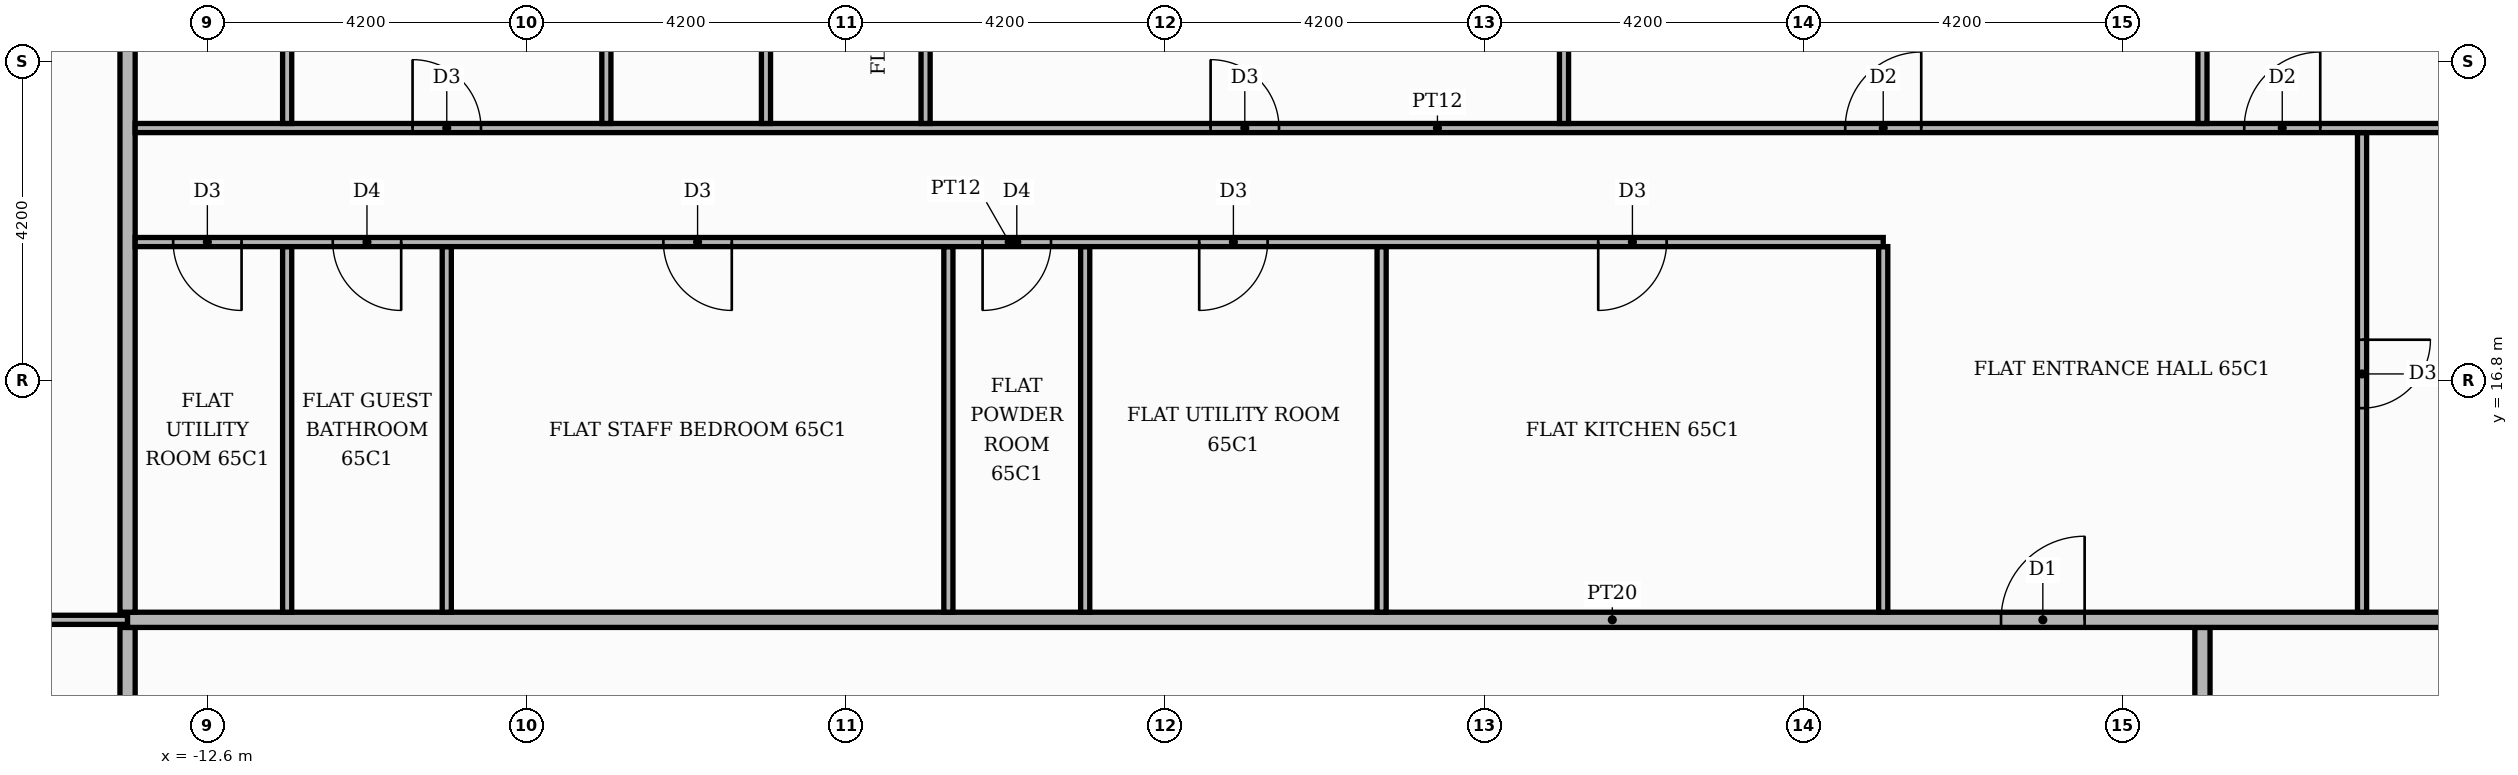
"""IFC4 building model, lengths in metres.
Left out: names, types, materials, properties, quantities, classifications, styles, units other than length and angle.
Written with IfcOpenShell. Run it as: python <this file> out.ifc"""

import sys

from ifc_helpers import new_model, si_unit, direction, frame, frame_2d, origin, place, context, subcontext, project, spatial, rectangle, extrude, element, fill, save


model = new_model("IFC4")
c1 = context("Model", 3, precision=1e-05, world=origin(), true_north=direction((0.0, 1.0)))
c2 = subcontext(c1, "Body", "Model", "MODEL_VIEW")
j1 = project(units=[si_unit("LENGTHUNIT", "METRE"), si_unit("PLANEANGLEUNIT", "RADIAN")], contexts=[c1])
p1 = place(None, origin())
s1 = spatial("IfcSite", under=j1, at=p1, CompositionType="ELEMENT")
p2 = place(p1, origin())
s2 = spatial("IfcBuilding", under=s1, at=p2, CompositionType="ELEMENT")
p3 = place(p2, frame((0.0, 0.0, 271.8)))
s3 = spatial("IfcBuildingStorey", under=s2, at=p3, CompositionType="ELEMENT", Elevation=271.8)
for number, where, z_axis, x_axis in (
    (1, (-13.65, 11.1, 0.0), (0.0, 0.0, 1.0), (0.0, 1.0, 0.0)),
    (2, (13.65, 11.1, 0.0), (0.0, 0.0, 1.0), (0.0, 1.0, 0.0)),
):
    element("IfcWall", number, at=place(p3, frame(where, z_axis=z_axis, x_axis=x_axis)), inside=s3, PredefinedType="PARTITIONING", context=c2, shape_type="SweptSolid", body=[
        extrude(rectangle(XDim=2.45, YDim=0.2, at=frame_2d((1.225, 0.0))), origin(), (0.0, 0.0, 1.0), 3.48),
    ])
p4 = place(p3, frame((-20.42, 13.65, 0.0), z_axis=(0.0, 0.0, 1.0), x_axis=(1.0, 0.0, 0.0)))
e3 = element("IfcWall", 3, at=p4, inside=s3, PredefinedType="PARTITIONING", context=c2, shape_type="SweptSolid", body=[
    extrude(rectangle(XDim=6.77, YDim=0.12, at=frame_2d((3.385, 0.0))), origin(), (0.0, 0.0, 1.0), 3.48),
])
p5 = place(p4, frame((2.885, 0.0, 0.0)))
e4 = element("IfcOpeningElement", 4, at=p5, cuts=e3, PredefinedType="OPENING", context=c2, shape_type="SweptSolid", body=[
    extrude(rectangle(XDim=1.0, YDim=2.1, at=frame_2d((0.5, 1.05))), frame((0.0, 0.07, 0.0), z_axis=(0.0, -1.0, 0.0), x_axis=(1.0, 0.0, 0.0)), (0.0, 0.0, 1.0), 0.14),
])
p6 = place(p3, frame((-13.65, 13.65, 0.0), z_axis=(0.0, 0.0, 1.0), x_axis=(1.0, 0.0, 0.0)))
e5 = element("IfcWall", 5, at=p6, inside=s3, PredefinedType="PARTITIONING", context=c2, shape_type="SweptSolid", body=[
    extrude(rectangle(XDim=39.07, YDim=0.2, at=frame_2d((19.535, 0.0))), origin(), (0.0, 0.0, 1.0), 3.48),
])
p7 = place(p6, frame((24.65, 0.0, 0.0)))
e6 = element("IfcOpeningElement", 6, at=p7, cuts=e5, PredefinedType="OPENING", context=c2, shape_type="SweptSolid", body=[
    extrude(rectangle(XDim=1.1, YDim=2.4, at=frame_2d((0.55, 1.2))), frame((0.0, 0.11, 0.0), z_axis=(0.0, -1.0, 0.0), x_axis=(1.0, 0.0, 0.0)), (0.0, 0.0, 1.0), 0.22),
])
p8 = place(p3, frame((-13.65, 13.75, 0.0), z_axis=(0.0, 0.0, 1.0), x_axis=(0.0, 1.0, 0.0)))
e7 = element("IfcWall", 7, at=p8, inside=s3, PredefinedType="PARTITIONING", context=c2, shape_type="SweptSolid", body=[
    extrude(rectangle(XDim=11.67, YDim=0.2, at=frame_2d((5.835, 0.0))), origin(), (0.0, 0.0, 1.0), 3.48),
])
for number, where, z_axis, x_axis in (
    (8, (-11.55, 13.75, 0.0), (0.0, 0.0, 1.0), (0.0, 1.0, 0.0)),
    (9, (-9.45, 13.75, 0.0), (0.0, 0.0, 1.0), (0.0, 1.0, 0.0)),
    (10, (-2.85, 13.75, 0.0), (0.0, 0.0, 1.0), (0.0, 1.0, 0.0)),
    (11, (-1.05, 13.75, 0.0), (0.0, 0.0, 1.0), (0.0, 1.0, 0.0)),
    (12, (2.85, 13.75, 0.0), (0.0, 0.0, 1.0), (0.0, 1.0, 0.0)),
    (13, (9.45, 13.75, 0.0), (0.0, 0.0, 1.0), (0.0, 1.0, 0.0)),
):
    element("IfcWall", number, at=place(p3, frame(where, z_axis=z_axis, x_axis=x_axis)), inside=s3, PredefinedType="PARTITIONING", context=c2, shape_type="SweptSolid", body=[
        extrude(rectangle(XDim=4.81, YDim=0.12, at=frame_2d((2.405, 0.0))), origin(), (0.0, 0.0, 1.0), 3.48),
    ])
p9 = place(p3, frame((15.75, 13.75, 0.0), z_axis=(0.0, 0.0, 1.0), x_axis=(0.0, 1.0, 0.0)))
e14 = element("IfcWall", 14, at=p9, inside=s3, PredefinedType="PARTITIONING", context=c2, shape_type="SweptSolid", body=[
    extrude(rectangle(XDim=6.31, YDim=0.12, at=frame_2d((3.155, 0.0))), origin(), (0.0, 0.0, 1.0), 3.48),
])
p10 = place(p9, frame((2.685, 0.0, 0.0)))
e15 = element("IfcOpeningElement", 15, at=p10, cuts=e14, PredefinedType="OPENING", context=c2, shape_type="SweptSolid", body=[
    extrude(rectangle(XDim=0.9, YDim=2.1, at=frame_2d((0.45, 1.05))), frame((0.0, 0.07, 0.0), z_axis=(0.0, -1.0, 0.0), x_axis=(1.0, 0.0, 0.0)), (0.0, 0.0, 1.0), 0.14),
])
p11 = place(p3, frame((-13.55, 18.62, 0.0), z_axis=(0.0, 0.0, 1.0), x_axis=(1.0, 0.0, 0.0)))
e16 = element("IfcWall", 16, at=p11, inside=s3, PredefinedType="PARTITIONING", context=c2, shape_type="SweptSolid", body=[
    extrude(rectangle(XDim=23.0, YDim=0.12, at=frame_2d((11.5, 0.0))), origin(), (0.0, 0.0, 1.0), 3.48),
])
p12 = place(p11, frame((19.25, 0.0, 0.0)))
e17 = element("IfcOpeningElement", 17, at=p12, cuts=e16, PredefinedType="OPENING", context=c2, shape_type="SweptSolid", body=[
    extrude(rectangle(XDim=0.9, YDim=2.1, at=frame_2d((0.45, 1.05))), frame((0.0, 0.07, 0.0), z_axis=(0.0, -1.0, 0.0), x_axis=(1.0, 0.0, 0.0)), (0.0, 0.0, 1.0), 0.14),
])
p13 = place(p11, frame((14.0, 0.0, 0.0)))
e18 = element("IfcOpeningElement", 18, at=p13, cuts=e16, PredefinedType="OPENING", context=c2, shape_type="SweptSolid", body=[
    extrude(rectangle(XDim=0.9, YDim=2.1, at=frame_2d((0.45, 1.05))), frame((0.0, 0.07, 0.0), z_axis=(0.0, -1.0, 0.0), x_axis=(1.0, 0.0, 0.0)), (0.0, 0.0, 1.0), 0.14),
])
p14 = place(p11, frame((11.15, 0.0, 0.0)))
e19 = element("IfcOpeningElement", 19, at=p14, cuts=e16, PredefinedType="OPENING", context=c2, shape_type="SweptSolid", body=[
    extrude(rectangle(XDim=0.9, YDim=2.1, at=frame_2d((0.45, 1.05))), frame((0.0, 0.07, 0.0), z_axis=(0.0, -1.0, 0.0), x_axis=(1.0, 0.0, 0.0)), (0.0, 0.0, 1.0), 0.14),
])
p15 = place(p11, frame((6.95, 0.0, 0.0)))
e20 = element("IfcOpeningElement", 20, at=p15, cuts=e16, PredefinedType="OPENING", context=c2, shape_type="SweptSolid", body=[
    extrude(rectangle(XDim=0.9, YDim=2.1, at=frame_2d((0.45, 1.05))), frame((0.0, 0.07, 0.0), z_axis=(0.0, -1.0, 0.0), x_axis=(1.0, 0.0, 0.0)), (0.0, 0.0, 1.0), 0.14),
])
p16 = place(p11, frame((2.6, 0.0, 0.0)))
e21 = element("IfcOpeningElement", 21, at=p16, cuts=e16, PredefinedType="OPENING", context=c2, shape_type="SweptSolid", body=[
    extrude(rectangle(XDim=0.9, YDim=2.1, at=frame_2d((0.45, 1.05))), frame((0.0, 0.07, 0.0), z_axis=(0.0, -1.0, 0.0), x_axis=(1.0, 0.0, 0.0)), (0.0, 0.0, 1.0), 0.14),
])
p17 = place(p11, frame((0.5, 0.0, 0.0)))
e22 = element("IfcOpeningElement", 22, at=p17, cuts=e16, PredefinedType="OPENING", context=c2, shape_type="SweptSolid", body=[
    extrude(rectangle(XDim=0.9, YDim=2.1, at=frame_2d((0.45, 1.05))), frame((0.0, 0.07, 0.0), z_axis=(0.0, -1.0, 0.0), x_axis=(1.0, 0.0, 0.0)), (0.0, 0.0, 1.0), 0.14),
])
p18 = place(p3, frame((-13.55, 20.12, 0.0), z_axis=(0.0, 0.0, 1.0), x_axis=(1.0, 0.0, 0.0)))
e23 = element("IfcWall", 23, at=p18, inside=s3, PredefinedType="PARTITIONING", context=c2, shape_type="SweptSolid", body=[
    extrude(rectangle(XDim=34.269, YDim=0.12, at=frame_2d((17.135, 0.0))), origin(), (0.0, 0.0, 1.0), 3.48),
])
p19 = place(p18, frame((27.75, 0.0, 0.0)))
e24 = element("IfcOpeningElement", 24, at=p19, cuts=e23, PredefinedType="OPENING", context=c2, shape_type="SweptSolid", body=[
    extrude(rectangle(XDim=1.0, YDim=2.1, at=frame_2d((0.5, 1.05))), frame((0.0, 0.07, 0.0), z_axis=(0.0, -1.0, 0.0), x_axis=(1.0, 0.0, 0.0)), (0.0, 0.0, 1.0), 0.14),
])
p20 = place(p18, frame((22.5, 0.0, 0.0)))
e25 = element("IfcOpeningElement", 25, at=p20, cuts=e23, PredefinedType="OPENING", context=c2, shape_type="SweptSolid", body=[
    extrude(rectangle(XDim=1.0, YDim=2.1, at=frame_2d((0.5, 1.05))), frame((0.0, 0.07, 0.0), z_axis=(0.0, -1.0, 0.0), x_axis=(1.0, 0.0, 0.0)), (0.0, 0.0, 1.0), 0.14),
])
p21 = place(p18, frame((14.15, 0.0, 0.0)))
e26 = element("IfcOpeningElement", 26, at=p21, cuts=e23, PredefinedType="OPENING", context=c2, shape_type="SweptSolid", body=[
    extrude(rectangle(XDim=0.9, YDim=2.1, at=frame_2d((0.45, 1.05))), frame((0.0, 0.07, 0.0), z_axis=(0.0, -1.0, 0.0), x_axis=(1.0, 0.0, 0.0)), (0.0, 0.0, 1.0), 0.14),
])
p22 = place(p18, frame((3.65, 0.0, 0.0)))
e27 = element("IfcOpeningElement", 27, at=p22, cuts=e23, PredefinedType="OPENING", context=c2, shape_type="SweptSolid", body=[
    extrude(rectangle(XDim=0.9, YDim=2.1, at=frame_2d((0.45, 1.05))), frame((0.0, 0.07, 0.0), z_axis=(0.0, -1.0, 0.0), x_axis=(1.0, 0.0, 0.0)), (0.0, 0.0, 1.0), 0.14),
])
p23 = place(p3, frame((-11.55, 20.18, 0.0), z_axis=(0.0, 0.0, 1.0), x_axis=(0.0, 1.0, 0.0)))
e28 = element("IfcWall", 28, at=p23, inside=s3, PredefinedType="PARTITIONING", context=c2, shape_type="SweptSolid", body=[
    extrude(rectangle(XDim=5.24, YDim=0.12, at=frame_2d((2.62, 0.0))), origin(), (0.0, 0.0, 1.0), 3.48),
])
p24 = place(p23, frame((2.29, 0.0, 0.0)))
e29 = element("IfcOpeningElement", 29, at=p24, cuts=e28, PredefinedType="OPENING", context=c2, shape_type="SweptSolid", body=[
    extrude(rectangle(XDim=0.9, YDim=2.1, at=frame_2d((0.45, 1.05))), frame((0.0, 0.07, 0.0), z_axis=(0.0, -1.0, 0.0), x_axis=(1.0, 0.0, 0.0)), (0.0, 0.0, 1.0), 0.14),
])
p25 = place(p3, frame((-7.35, 20.18, 0.0), z_axis=(0.0, 0.0, 1.0), x_axis=(0.0, 1.0, 0.0)))
e30 = element("IfcWall", 30, at=p25, inside=s3, PredefinedType="PARTITIONING", context=c2, shape_type="SweptSolid", body=[
    extrude(rectangle(XDim=5.24, YDim=0.12, at=frame_2d((2.62, 0.0))), origin(), (0.0, 0.0, 1.0), 3.48),
])
p26 = place(p3, frame((-5.25, 20.18, 0.0), z_axis=(0.0, 0.0, 1.0), x_axis=(0.0, 1.0, 0.0)))
e31 = element("IfcWall", 31, at=p26, inside=s3, PredefinedType="PARTITIONING", context=c2, shape_type="SweptSolid", body=[
    extrude(rectangle(XDim=5.24, YDim=0.12, at=frame_2d((2.62, 0.0))), origin(), (0.0, 0.0, 1.0), 3.48),
])
p27 = place(p26, frame((2.29, 0.0, 0.0)))
e32 = element("IfcOpeningElement", 32, at=p27, cuts=e31, PredefinedType="OPENING", context=c2, shape_type="SweptSolid", body=[
    extrude(rectangle(XDim=0.9, YDim=2.1, at=frame_2d((0.45, 1.05))), frame((0.0, 0.07, 0.0), z_axis=(0.0, -1.0, 0.0), x_axis=(1.0, 0.0, 0.0)), (0.0, 0.0, 1.0), 0.14),
])
p28 = place(p3, frame((-3.15, 20.18, 0.0), z_axis=(0.0, 0.0, 1.0), x_axis=(0.0, 1.0, 0.0)))
e33 = element("IfcWall", 33, at=p28, inside=s3, PredefinedType="PARTITIONING", context=c2, shape_type="SweptSolid", body=[
    extrude(rectangle(XDim=5.24, YDim=0.12, at=frame_2d((2.62, 0.0))), origin(), (0.0, 0.0, 1.0), 3.48),
])
p29 = place(p28, frame((2.29, 0.0, 0.0)))
e34 = element("IfcOpeningElement", 34, at=p29, cuts=e33, PredefinedType="OPENING", context=c2, shape_type="SweptSolid", body=[
    extrude(rectangle(XDim=0.9, YDim=2.1, at=frame_2d((0.45, 1.05))), frame((0.0, 0.07, 0.0), z_axis=(0.0, -1.0, 0.0), x_axis=(1.0, 0.0, 0.0)), (0.0, 0.0, 1.0), 0.14),
])
for number, where, z_axis, x_axis in (
    (35, (5.25, 20.18, 0.0), (0.0, 0.0, 1.0), (0.0, 1.0, 0.0)),
    (36, (13.65, 20.18, 0.0), (0.0, 0.0, 1.0), (0.0, 1.0, 0.0)),
):
    element("IfcWall", number, at=place(p3, frame(where, z_axis=z_axis, x_axis=x_axis)), inside=s3, PredefinedType="PARTITIONING", context=c2, shape_type="SweptSolid", body=[
        extrude(rectangle(XDim=5.24, YDim=0.12, at=frame_2d((2.62, 0.0))), origin(), (0.0, 0.0, 1.0), 3.48),
    ])
p30 = place(p7, origin())
e37 = element("IfcDoor", 37, at=p30, inside=s3, OperationType="SINGLE_SWING_RIGHT", PredefinedType="DOOR", context=c2, shape_type="SweptSolid", body=[
    extrude(rectangle(XDim=1.1, YDim=2.4, at=frame_2d((0.55, 1.2))), frame((0.0, 0.025, 0.0), z_axis=(0.0, -1.0, 0.0), x_axis=(1.0, 0.0, 0.0)), (0.0, 0.0, 1.0), 0.05),
])
fill(e6, e37)
p31 = place(p10, frame((0.9, 0.0, 0.0), z_axis=(0.0, 0.0, 1.0), x_axis=(-1.0, 0.0, 0.0)))
e38 = element("IfcDoor", 38, at=p31, inside=s3, OperationType="SINGLE_SWING_RIGHT", PredefinedType="DOOR", context=c2, shape_type="SweptSolid", body=[
    extrude(rectangle(XDim=0.9, YDim=2.1, at=frame_2d((0.45, 1.05))), frame((0.0, 0.025, 0.0), z_axis=(0.0, -1.0, 0.0), x_axis=(1.0, 0.0, 0.0)), (0.0, 0.0, 1.0), 0.05),
])
fill(e15, e38)
p32 = place(p12, frame((0.9, 0.0, 0.0), z_axis=(0.0, 0.0, 1.0), x_axis=(-1.0, 0.0, 0.0)))
e39 = element("IfcDoor", 39, at=p32, inside=s3, OperationType="SINGLE_SWING_LEFT", PredefinedType="DOOR", context=c2, shape_type="SweptSolid", body=[
    extrude(rectangle(XDim=0.9, YDim=2.1, at=frame_2d((0.45, 1.05))), frame((0.0, 0.025, 0.0), z_axis=(0.0, -1.0, 0.0), x_axis=(1.0, 0.0, 0.0)), (0.0, 0.0, 1.0), 0.05),
])
fill(e17, e39)
p33 = place(p13, frame((0.9, 0.0, 0.0), z_axis=(0.0, 0.0, 1.0), x_axis=(-1.0, 0.0, 0.0)))
e40 = element("IfcDoor", 40, at=p33, inside=s3, OperationType="SINGLE_SWING_LEFT", PredefinedType="DOOR", context=c2, shape_type="SweptSolid", body=[
    extrude(rectangle(XDim=0.9, YDim=2.1, at=frame_2d((0.45, 1.05))), frame((0.0, 0.025, 0.0), z_axis=(0.0, -1.0, 0.0), x_axis=(1.0, 0.0, 0.0)), (0.0, 0.0, 1.0), 0.05),
])
fill(e18, e40)
p34 = place(p14, frame((0.9, 0.0, 0.0), z_axis=(0.0, 0.0, 1.0), x_axis=(-1.0, 0.0, 0.0)))
e41 = element("IfcDoor", 41, at=p34, inside=s3, OperationType="SINGLE_SWING_LEFT", PredefinedType="DOOR", context=c2, shape_type="SweptSolid", body=[
    extrude(rectangle(XDim=0.9, YDim=2.1, at=frame_2d((0.45, 1.05))), frame((0.0, 0.025, 0.0), z_axis=(0.0, -1.0, 0.0), x_axis=(1.0, 0.0, 0.0)), (0.0, 0.0, 1.0), 0.05),
])
fill(e19, e41)
p35 = place(p15, frame((0.9, 0.0, 0.0), z_axis=(0.0, 0.0, 1.0), x_axis=(-1.0, 0.0, 0.0)))
e42 = element("IfcDoor", 42, at=p35, inside=s3, OperationType="SINGLE_SWING_RIGHT", PredefinedType="DOOR", context=c2, shape_type="SweptSolid", body=[
    extrude(rectangle(XDim=0.9, YDim=2.1, at=frame_2d((0.45, 1.05))), frame((0.0, 0.025, 0.0), z_axis=(0.0, -1.0, 0.0), x_axis=(1.0, 0.0, 0.0)), (0.0, 0.0, 1.0), 0.05),
])
fill(e20, e42)
p36 = place(p16, frame((0.9, 0.0, 0.0), z_axis=(0.0, 0.0, 1.0), x_axis=(-1.0, 0.0, 0.0)))
e43 = element("IfcDoor", 43, at=p36, inside=s3, OperationType="SINGLE_SWING_RIGHT", PredefinedType="DOOR", context=c2, shape_type="SweptSolid", body=[
    extrude(rectangle(XDim=0.9, YDim=2.1, at=frame_2d((0.45, 1.05))), frame((0.0, 0.025, 0.0), z_axis=(0.0, -1.0, 0.0), x_axis=(1.0, 0.0, 0.0)), (0.0, 0.0, 1.0), 0.05),
])
fill(e21, e43)
p37 = place(p17, frame((0.9, 0.0, 0.0), z_axis=(0.0, 0.0, 1.0), x_axis=(-1.0, 0.0, 0.0)))
e44 = element("IfcDoor", 44, at=p37, inside=s3, OperationType="SINGLE_SWING_RIGHT", PredefinedType="DOOR", context=c2, shape_type="SweptSolid", body=[
    extrude(rectangle(XDim=0.9, YDim=2.1, at=frame_2d((0.45, 1.05))), frame((0.0, 0.025, 0.0), z_axis=(0.0, -1.0, 0.0), x_axis=(1.0, 0.0, 0.0)), (0.0, 0.0, 1.0), 0.05),
])
fill(e22, e44)
p38 = place(p19, origin())
e45 = element("IfcDoor", 45, at=p38, inside=s3, OperationType="SINGLE_SWING_RIGHT", PredefinedType="DOOR", context=c2, shape_type="SweptSolid", body=[
    extrude(rectangle(XDim=1.0, YDim=2.1, at=frame_2d((0.5, 1.05))), frame((0.0, 0.025, 0.0), z_axis=(0.0, -1.0, 0.0), x_axis=(1.0, 0.0, 0.0)), (0.0, 0.0, 1.0), 0.05),
])
fill(e24, e45)
p39 = place(p20, origin())
e46 = element("IfcDoor", 46, at=p39, inside=s3, OperationType="SINGLE_SWING_RIGHT", PredefinedType="DOOR", context=c2, shape_type="SweptSolid", body=[
    extrude(rectangle(XDim=1.0, YDim=2.1, at=frame_2d((0.5, 1.05))), frame((0.0, 0.025, 0.0), z_axis=(0.0, -1.0, 0.0), x_axis=(1.0, 0.0, 0.0)), (0.0, 0.0, 1.0), 0.05),
])
fill(e25, e46)
p40 = place(p21, origin())
e47 = element("IfcDoor", 47, at=p40, inside=s3, OperationType="SINGLE_SWING_LEFT", PredefinedType="DOOR", context=c2, shape_type="SweptSolid", body=[
    extrude(rectangle(XDim=0.9, YDim=2.1, at=frame_2d((0.45, 1.05))), frame((0.0, 0.025, 0.0), z_axis=(0.0, -1.0, 0.0), x_axis=(1.0, 0.0, 0.0)), (0.0, 0.0, 1.0), 0.05),
])
fill(e26, e47)
p41 = place(p22, origin())
e48 = element("IfcDoor", 48, at=p41, inside=s3, OperationType="SINGLE_SWING_LEFT", PredefinedType="DOOR", context=c2, shape_type="SweptSolid", body=[
    extrude(rectangle(XDim=0.9, YDim=2.1, at=frame_2d((0.45, 1.05))), frame((0.0, 0.025, 0.0), z_axis=(0.0, -1.0, 0.0), x_axis=(1.0, 0.0, 0.0)), (0.0, 0.0, 1.0), 0.05),
])
fill(e27, e48)
save(model, sys.argv[1])
